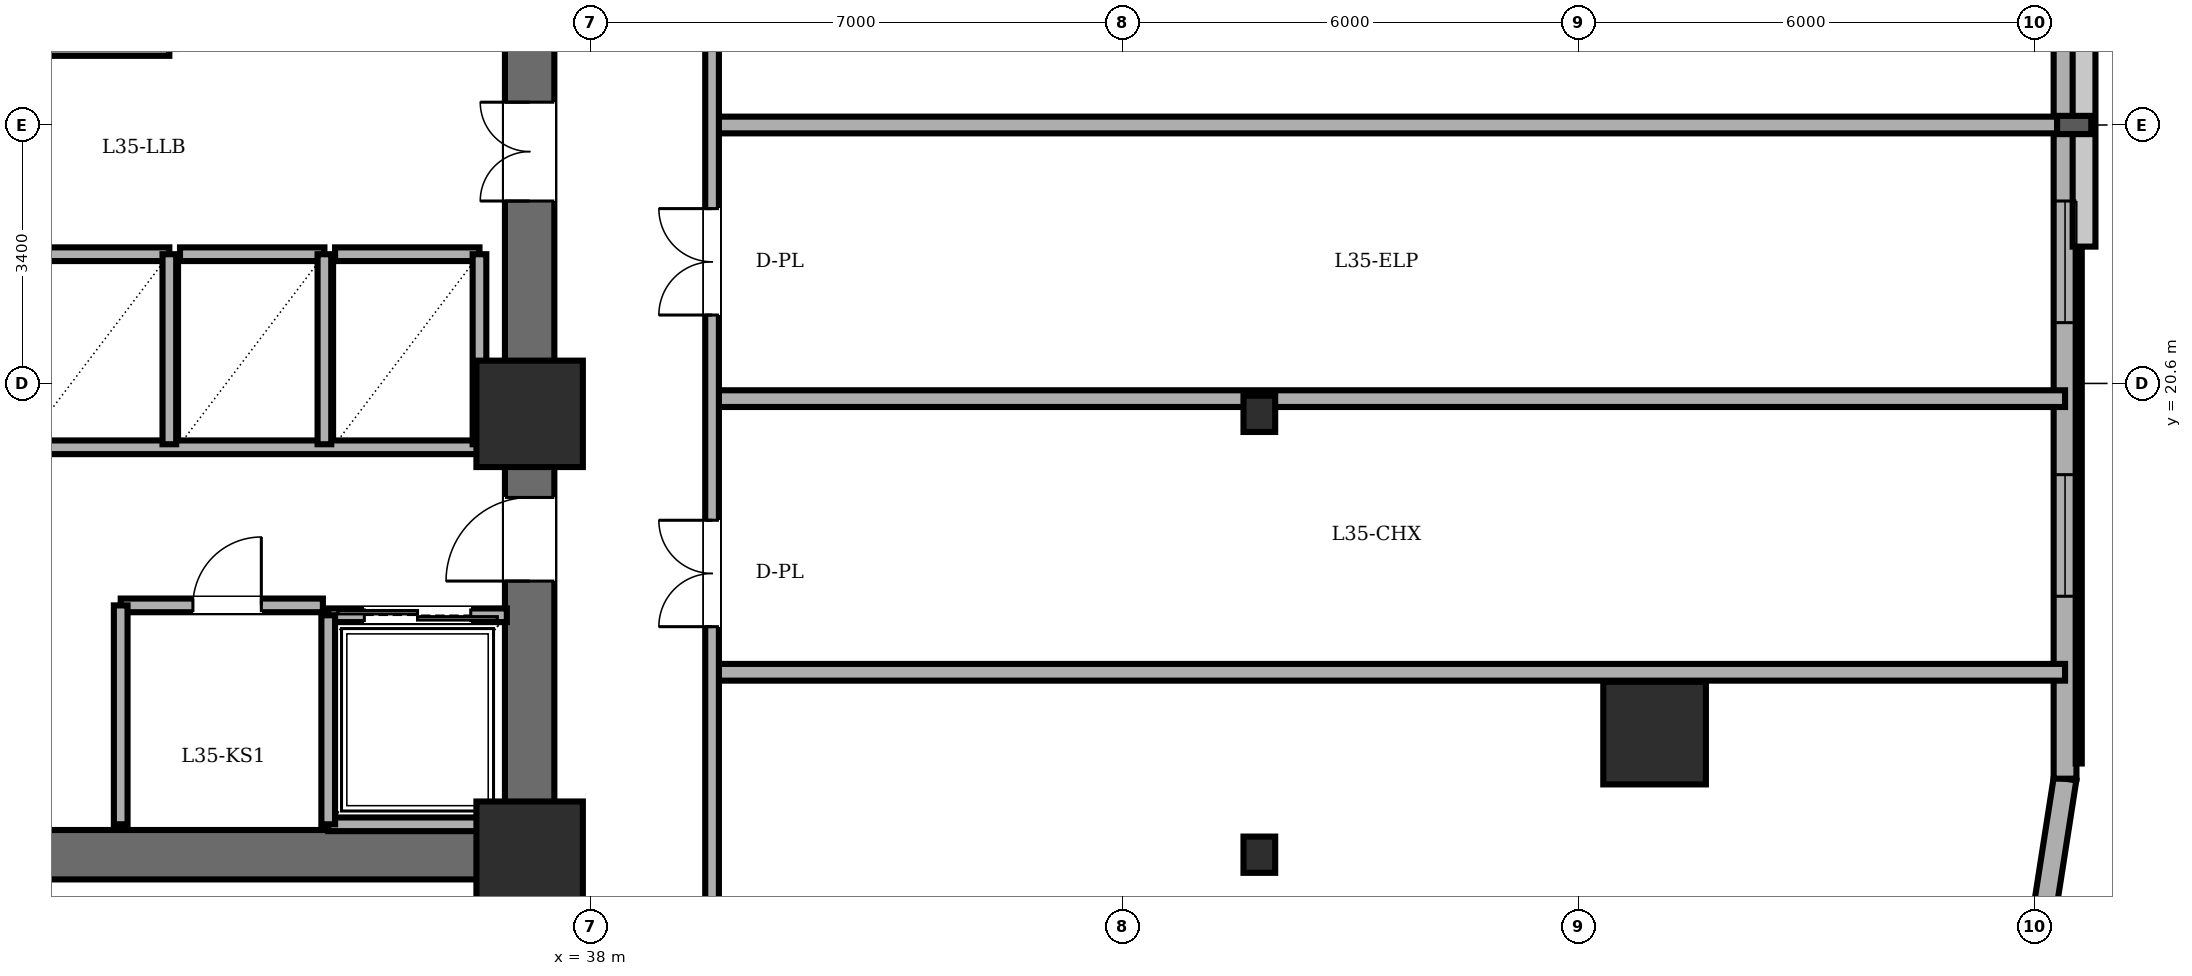
"""IFC4 building model, lengths in metres.
Left out: names, types, materials, properties, quantities, classifications, styles, units other than length and angle.
Written with IfcOpenShell. Run it as: python <this file> out.ifc"""

import sys

from ifc_helpers import new_model, si_unit, direction, frame, frame_2d, origin, origin_2d, place, context, subcontext, project, spatial, rectangle, circle, i_section, extrude, element, fill, save


model = new_model("IFC4")
c1 = context("Model", 3, precision=1e-05, world=origin(), true_north=direction((0.0, 1.0)))
c2 = subcontext(c1, "Body", "Model", "MODEL_VIEW")
j1 = project(units=[si_unit("LENGTHUNIT", "METRE"), si_unit("PLANEANGLEUNIT", "RADIAN")], contexts=[c1])
p1 = place(None, origin())
s1 = spatial("IfcSite", under=j1, at=p1, CompositionType="ELEMENT")
p2 = place(p1, origin())
s2 = spatial("IfcBuilding", under=s1, at=p2, CompositionType="ELEMENT")
p3 = place(p2, frame((0.0, 0.0, 133.1)))
s3 = spatial("IfcBuildingStorey", under=s2, at=p3, CompositionType="ELEMENT", Elevation=133.1)
for number, where, z_axis, x_axis in (
    (1, (37.2, 14.4, 0.0), (0.0, 0.0, 1.0), (1.0, 0.0, 0.0)),
    (2, (37.2, 20.2, 0.0), (0.0, 0.0, 1.0), (1.0, 0.0, 0.0)),
):
    element("IfcColumn", number, at=place(p3, frame(where, z_axis=z_axis, x_axis=x_axis)), inside=s3, PredefinedType="COLUMN", context=c2, shape_type="SweptSolid", body=[
        extrude(rectangle(XDim=1.4, YDim=1.4, at=origin_2d()), origin(), (0.0, 0.0, 1.0), 5.6),
    ])
p4 = place(p3, frame((52.0, 16.0, 0.0), z_axis=(0.0, 0.0, 1.0), x_axis=(1.0, 0.0, 0.0)))
e3 = element("IfcColumn", 3, at=p4, inside=s3, PredefinedType="COLUMN", context=c2, shape_type="SweptSolid", body=[
    extrude(circle(Radius=0.675, at=origin_2d()), origin(), (0.0, 0.0, 1.0), 2.96),
])
for number, where, z_axis, x_axis in (
    (4, (46.8, 14.4, 0.0), (0.0, 0.0, 1.0), (1.0, 0.0, 0.0)),
    (5, (46.8, 20.2, 0.0), (0.0, 0.0, 1.0), (1.0, 0.0, 0.0)),
):
    element("IfcColumn", number, at=place(p3, frame(where, z_axis=z_axis, x_axis=x_axis)), inside=s3, PredefinedType="COLUMN", context=c2, shape_type="SweptSolid", body=[
        extrude(i_section(OverallWidth=0.417, OverallDepth=0.477, WebThickness=0.036, FlangeThickness=0.057, FilletRadius=0.015, at=origin_2d()), origin(), (0.0, 0.0, 1.0), 2.96),
    ])
p5 = place(p3, frame((57.135, 13.696, 0.0), z_axis=(0.0, 0.0, 1.0), x_axis=(0.153620989032, 0.988129845581, 0.0)))
e6 = element("IfcWall", 6, at=p5, inside=s3, PredefinedType="SOLIDWALL", context=c2, shape_type="SweptSolid", body=[
    extrude(rectangle(XDim=1.724, YDim=0.3, at=frame_2d((0.862, 0.0))), origin(), (0.0, 0.0, 1.0), 5.36),
])
p6 = place(p3, frame((57.4, 15.4, 0.0), z_axis=(0.0, 0.0, 1.0), x_axis=(0.0, 1.0, 0.0)))
e7 = element("IfcWall", 7, at=p6, inside=s3, PredefinedType="SOLIDWALL", context=c2, shape_type="SweptSolid", body=[
    extrude(rectangle(XDim=17.2, YDim=0.3, at=frame_2d((8.6, 0.0))), origin(), (0.0, 0.0, 1.0), 5.36),
])
p7 = place(p6, frame((2.4, 0.0, 0.85)))
e8 = element("IfcOpeningElement", 8, at=p7, cuts=e7, PredefinedType="OPENING", context=c2, shape_type="SweptSolid", body=[
    extrude(rectangle(XDim=1.6, YDim=1.2, at=frame_2d((0.8, 0.6))), frame((0.0, 0.16, 0.0), z_axis=(0.0, -1.0, 0.0), x_axis=(1.0, 0.0, 0.0)), (0.0, 0.0, 1.0), 0.32),
])
p8 = place(p6, frame((6.0, 0.0, 0.85)))
e9 = element("IfcOpeningElement", 9, at=p8, cuts=e7, PredefinedType="OPENING", context=c2, shape_type="SweptSolid", body=[
    extrude(rectangle(XDim=1.6, YDim=1.2, at=frame_2d((0.8, 0.6))), frame((0.0, 0.16, 0.0), z_axis=(0.0, -1.0, 0.0), x_axis=(1.0, 0.0, 0.0)), (0.0, 0.0, 1.0), 0.32),
])
p9 = place(p6, frame((10.55, 0.0, 0.85)))
e10 = element("IfcOpeningElement", 10, at=p9, cuts=e7, PredefinedType="OPENING", context=c2, shape_type="SweptSolid", body=[
    extrude(rectangle(XDim=1.6, YDim=1.2, at=frame_2d((0.8, 0.6))), frame((0.0, 0.16, 0.0), z_axis=(0.0, -1.0, 0.0), x_axis=(1.0, 0.0, 0.0)), (0.0, 0.0, 1.0), 0.32),
])
p10 = place(p6, frame((13.3, 0.0, 0.85)))
e11 = element("IfcOpeningElement", 11, at=p10, cuts=e7, PredefinedType="OPENING", context=c2, shape_type="SweptSolid", body=[
    extrude(rectangle(XDim=1.6, YDim=1.2, at=frame_2d((0.8, 0.6))), frame((0.0, 0.16, 0.0), z_axis=(0.0, -1.0, 0.0), x_axis=(1.0, 0.0, 0.0)), (0.0, 0.0, 1.0), 0.32),
])
p11 = place(p3, frame((37.2, 14.4, 0.0), z_axis=(0.0, 0.0, 1.0), x_axis=(-1.0, 0.0, 0.0)))
e12 = element("IfcWall", 12, at=p11, inside=s3, PredefinedType="SHEAR", context=c2, shape_type="SweptSolid", body=[
    extrude(rectangle(XDim=15.6, YDim=0.65, at=frame_2d((7.8, 0.0))), origin(), (0.0, 0.0, 1.0), 5.36),
])
p12 = place(p3, frame((37.2, 14.4, 0.0), z_axis=(0.0, 0.0, 1.0), x_axis=(0.0, 1.0, 0.0)))
e13 = element("IfcWall", 13, at=p12, inside=s3, PredefinedType="SHEAR", context=c2, shape_type="SweptSolid", body=[
    extrude(rectangle(XDim=19.2, YDim=0.65, at=frame_2d((9.6, 0.0))), origin(), (0.0, 0.0, 1.0), 5.36),
])
p13 = place(p12, frame((15.8, 0.0, 0.0)))
e14 = element("IfcOpeningElement", 14, at=p13, cuts=e13, PredefinedType="OPENING", context=c2, shape_type="SweptSolid", body=[
    extrude(rectangle(XDim=1.15, YDim=2.15, at=frame_2d((0.575, 1.075))), frame((0.0, 0.335, 0.0), z_axis=(0.0, -1.0, 0.0), x_axis=(1.0, 0.0, 0.0)), (0.0, 0.0, 1.0), 0.67),
])
p14 = place(p12, frame((3.6, 0.0, 0.0)))
e15 = element("IfcOpeningElement", 15, at=p14, cuts=e13, PredefinedType="OPENING", context=c2, shape_type="SweptSolid", body=[
    extrude(rectangle(XDim=1.1, YDim=2.15, at=frame_2d((0.55, 1.075))), frame((0.0, 0.335, 0.0), z_axis=(0.0, -1.0, 0.0), x_axis=(1.0, 0.0, 0.0)), (0.0, 0.0, 1.0), 0.67),
])
p15 = place(p12, frame((8.6, 0.0, 0.0)))
e16 = element("IfcOpeningElement", 16, at=p15, cuts=e13, PredefinedType="OPENING", context=c2, shape_type="SweptSolid", body=[
    extrude(rectangle(XDim=1.3, YDim=2.2, at=frame_2d((0.65, 1.1))), frame((0.0, 0.335, 0.0), z_axis=(0.0, -1.0, 0.0), x_axis=(1.0, 0.0, 0.0)), (0.0, 0.0, 1.0), 0.67),
])
p16 = place(p3, frame((21.95, 19.76, 0.0), z_axis=(0.0, 0.0, 1.0), x_axis=(1.0, 0.0, 0.0)))
e17 = element("IfcWall", 17, at=p16, inside=s3, PredefinedType="PARTITIONING", context=c2, shape_type="SweptSolid", body=[
    extrude(rectangle(XDim=14.87, YDim=0.18, at=frame_2d((7.435, 0.0))), origin(), (0.0, 0.0, 1.0), 5.36),
])
p17 = place(p3, frame((31.82, 17.68, 0.0), z_axis=(0.0, 0.0, 1.0), x_axis=(1.0, 0.0, 0.0)))
e18 = element("IfcWall", 18, at=p17, inside=s3, PredefinedType="PARTITIONING", context=c2, shape_type="SweptSolid", body=[
    extrude(rectangle(XDim=2.66, YDim=0.18, at=frame_2d((1.33, 0.0))), origin(), (0.0, 0.0, 1.0), 5.36),
])
p18 = place(p17, frame((0.95, 0.0, 0.0)))
e19 = element("IfcOpeningElement", 19, at=p18, cuts=e18, PredefinedType="OPENING", context=c2, shape_type="SweptSolid", body=[
    extrude(rectangle(XDim=0.9, YDim=2.05, at=frame_2d((0.45, 1.025))), frame((0.0, 0.1, 0.0), z_axis=(0.0, -1.0, 0.0), x_axis=(1.0, 0.0, 0.0)), (0.0, 0.0, 1.0), 0.2),
])
p19 = place(p3, frame((31.82, 14.8, 0.0), z_axis=(0.0, 0.0, 1.0), x_axis=(0.0, 1.0, 0.0)))
e20 = element("IfcWall", 20, at=p19, inside=s3, PredefinedType="PARTITIONING", context=c2, shape_type="SweptSolid", body=[
    extrude(rectangle(XDim=2.88, YDim=0.18, at=frame_2d((1.44, 0.0))), origin(), (0.0, 0.0, 1.0), 5.36),
])
p20 = place(p3, frame((34.55, 17.55, 0.0), z_axis=(0.0, 0.0, 1.0), x_axis=(1.0, 0.0, 0.0)))
e21 = element("IfcWall", 21, at=p20, inside=s3, PredefinedType="PARTITIONING", context=c2, shape_type="SweptSolid", body=[
    extrude(rectangle(XDim=2.35, YDim=0.18, at=frame_2d((1.175, 0.0))), origin(), (0.0, 0.0, 1.0), 5.36),
])
p21 = place(p20, frame((0.475, 0.0, 0.0)))
e22 = element("IfcOpeningElement", 22, at=p21, cuts=e21, PredefinedType="OPENING", context=c2, shape_type="SweptSolid", body=[
    extrude(rectangle(XDim=1.4, YDim=2.3, at=frame_2d((0.7, 1.15))), frame((0.0, 0.1, 0.0), z_axis=(0.0, -1.0, 0.0), x_axis=(1.0, 0.0, 0.0)), (0.0, 0.0, 1.0), 0.2),
])
p22 = place(p3, frame((36.9, 14.8, 0.0), z_axis=(0.0, 0.0, 1.0), x_axis=(-1.0, 0.0, 0.0)))
e23 = element("IfcWall", 23, at=p22, inside=s3, PredefinedType="PARTITIONING", context=c2, shape_type="SweptSolid", body=[
    extrude(rectangle(XDim=2.35, YDim=0.18, at=frame_2d((1.175, 0.0))), origin(), (0.0, 0.0, 1.0), 2.942),
])
p23 = place(p3, frame((34.55, 17.55, 0.0), z_axis=(0.0, 0.0, 1.0), x_axis=(0.0, -1.0, 0.0)))
e24 = element("IfcWall", 24, at=p23, inside=s3, PredefinedType="PARTITIONING", context=c2, shape_type="SweptSolid", body=[
    extrude(rectangle(XDim=2.75, YDim=0.18, at=frame_2d((1.375, 0.0))), origin(), (0.0, 0.0, 1.0), 5.36),
])
p24 = place(p3, frame((32.46, 25.0, 0.0), z_axis=(0.0, 0.0, 1.0), x_axis=(-1.0, 0.0, 0.0)))
e25 = element("IfcWall", 25, at=p24, inside=s3, PredefinedType="PARTITIONING", context=c2, shape_type="SweptSolid", body=[
    extrude(rectangle(XDim=1.82, YDim=0.18, at=frame_2d((0.91, 0.0))), origin(), (0.0, 0.0, 1.0), 5.36),
])
p25 = place(p3, frame((30.56, 22.3, 0.0), z_axis=(0.0, 0.0, 1.0), x_axis=(1.0, 0.0, 0.0)))
e26 = element("IfcWall", 26, at=p25, inside=s3, PredefinedType="PARTITIONING", context=c2, shape_type="SweptSolid", body=[
    extrude(rectangle(XDim=1.9, YDim=0.18, at=frame_2d((0.95, 0.0))), origin(), (0.0, 0.0, 1.0), 5.36),
])
p26 = place(p3, frame((32.46, 19.8, 0.0), z_axis=(0.0, 0.0, 1.0), x_axis=(0.0, 1.0, 0.0)))
e27 = element("IfcWall", 27, at=p26, inside=s3, PredefinedType="PARTITIONING", context=c2, shape_type="SweptSolid", body=[
    extrude(rectangle(XDim=2.5, YDim=0.18, at=frame_2d((1.25, 0.0))), origin(), (0.0, 0.0, 1.0), 5.36),
])
p27 = place(p3, frame((32.6, 22.3, 0.0), z_axis=(0.0, 0.0, 1.0), x_axis=(1.0, 0.0, 0.0)))
e28 = element("IfcWall", 28, at=p27, inside=s3, PredefinedType="PARTITIONING", context=c2, shape_type="SweptSolid", body=[
    extrude(rectangle(XDim=1.9, YDim=0.18, at=frame_2d((0.95, 0.0))), origin(), (0.0, 0.0, 1.0), 5.36),
])
p28 = place(p3, frame((34.5, 19.8, 0.0), z_axis=(0.0, 0.0, 1.0), x_axis=(0.0, 1.0, 0.0)))
e29 = element("IfcWall", 29, at=p28, inside=s3, PredefinedType="PARTITIONING", context=c2, shape_type="SweptSolid", body=[
    extrude(rectangle(XDim=2.5, YDim=0.18, at=frame_2d((1.25, 0.0))), origin(), (0.0, 0.0, 1.0), 5.36),
])
p29 = place(p3, frame((34.64, 22.3, 0.0), z_axis=(0.0, 0.0, 1.0), x_axis=(1.0, 0.0, 0.0)))
e30 = element("IfcWall", 30, at=p29, inside=s3, PredefinedType="PARTITIONING", context=c2, shape_type="SweptSolid", body=[
    extrude(rectangle(XDim=1.9, YDim=0.18, at=frame_2d((0.95, 0.0))), origin(), (0.0, 0.0, 1.0), 5.36),
])
p30 = place(p3, frame((36.54, 19.8, 0.0), z_axis=(0.0, 0.0, 1.0), x_axis=(0.0, 1.0, 0.0)))
e31 = element("IfcWall", 31, at=p30, inside=s3, PredefinedType="PARTITIONING", context=c2, shape_type="SweptSolid", body=[
    extrude(rectangle(XDim=2.5, YDim=0.18, at=frame_2d((1.25, 0.0))), origin(), (0.0, 0.0, 1.0), 5.36),
])
p31 = place(p3, frame((39.6, 16.8, 0.0), z_axis=(0.0, 0.0, 1.0), x_axis=(1.0, 0.0, 0.0)))
e32 = element("IfcWall", 32, at=p31, inside=s3, PredefinedType="PARTITIONING", context=c2, shape_type="SweptSolid", body=[
    extrude(rectangle(XDim=17.8, YDim=0.22, at=frame_2d((8.9, 0.0))), origin(), (0.0, 0.0, 1.0), 5.36),
])
p32 = place(p3, frame((39.6, 20.4, 0.0), z_axis=(0.0, 0.0, 1.0), x_axis=(1.0, 0.0, 0.0)))
e33 = element("IfcWall", 33, at=p32, inside=s3, PredefinedType="PARTITIONING", context=c2, shape_type="SweptSolid", body=[
    extrude(rectangle(XDim=17.8, YDim=0.22, at=frame_2d((8.9, 0.0))), origin(), (0.0, 0.0, 1.0), 2.942),
])
p33 = place(p3, frame((39.6, 24.0, 0.0), z_axis=(0.0, 0.0, 1.0), x_axis=(1.0, 0.0, 0.0)))
e34 = element("IfcWall", 34, at=p33, inside=s3, PredefinedType="PARTITIONING", context=c2, shape_type="SweptSolid", body=[
    extrude(rectangle(XDim=17.8, YDim=0.22, at=frame_2d((8.9, 0.0))), origin(), (0.0, 0.0, 1.0), 5.012),
])
p34 = place(p3, frame((39.6, 11.8, 0.0), z_axis=(0.0, 0.0, 1.0), x_axis=(0.0, 1.0, 0.0)))
e35 = element("IfcWall", 35, at=p34, inside=s3, PredefinedType="PARTITIONING", context=c2, shape_type="SweptSolid", body=[
    extrude(rectangle(XDim=24.4, YDim=0.18, at=frame_2d((12.2, 0.0))), origin(), (0.0, 0.0, 1.0), 5.36),
])
p35 = place(p34, frame((18.07, 0.0, 0.0)))
e36 = element("IfcOpeningElement", 36, at=p35, cuts=e35, PredefinedType="OPENING", context=c2, shape_type="SweptSolid", body=[
    extrude(rectangle(XDim=1.4, YDim=2.25, at=frame_2d((0.7, 1.125))), frame((0.0, 0.1, 0.0), z_axis=(0.0, -1.0, 0.0), x_axis=(1.0, 0.0, 0.0)), (0.0, 0.0, 1.0), 0.2),
])
p36 = place(p34, frame((5.6, 0.0, 0.0)))
e37 = element("IfcOpeningElement", 37, at=p36, cuts=e35, PredefinedType="OPENING", context=c2, shape_type="SweptSolid", body=[
    extrude(rectangle(XDim=1.4, YDim=2.25, at=frame_2d((0.7, 1.125))), frame((0.0, 0.1, 0.0), z_axis=(0.0, -1.0, 0.0), x_axis=(1.0, 0.0, 0.0)), (0.0, 0.0, 1.0), 0.2),
])
p37 = place(p34, frame((9.7, 0.0, 0.0)))
e38 = element("IfcOpeningElement", 38, at=p37, cuts=e35, PredefinedType="OPENING", context=c2, shape_type="SweptSolid", body=[
    extrude(rectangle(XDim=1.4, YDim=2.25, at=frame_2d((0.7, 1.125))), frame((0.0, 0.1, 0.0), z_axis=(0.0, -1.0, 0.0), x_axis=(1.0, 0.0, 0.0)), (0.0, 0.0, 1.0), 0.2),
])
p38 = place(p7, origin())
e39 = element("IfcWindow", 39, at=p38, inside=s3, PartitioningType="DOUBLE_PANEL_VERTICAL", PredefinedType="WINDOW", context=c2, shape_type="SweptSolid", body=[
    extrude(rectangle(XDim=1.6, YDim=1.2, at=frame_2d((0.8, 0.6))), frame((0.0, 0.03, 0.0), z_axis=(0.0, -1.0, 0.0), x_axis=(1.0, 0.0, 0.0)), (0.0, 0.0, 1.0), 0.06),
])
fill(e8, e39)
p39 = place(p8, origin())
e40 = element("IfcWindow", 40, at=p39, inside=s3, PartitioningType="DOUBLE_PANEL_VERTICAL", PredefinedType="WINDOW", context=c2, shape_type="SweptSolid", body=[
    extrude(rectangle(XDim=1.6, YDim=1.2, at=frame_2d((0.8, 0.6))), frame((0.0, 0.03, 0.0), z_axis=(0.0, -1.0, 0.0), x_axis=(1.0, 0.0, 0.0)), (0.0, 0.0, 1.0), 0.06),
])
fill(e9, e40)
p40 = place(p14, origin())
e41 = element("IfcDoor", 41, at=p40, inside=s3, OperationType="SINGLE_SWING_LEFT", PredefinedType="DOOR", context=c2, shape_type="SweptSolid", body=[
    extrude(rectangle(XDim=1.1, YDim=2.15, at=frame_2d((0.55, 1.075))), frame((0.0, 0.025, 0.0), z_axis=(0.0, -1.0, 0.0), x_axis=(1.0, 0.0, 0.0)), (0.0, 0.0, 1.0), 0.05),
])
fill(e15, e41)
p41 = place(p18, origin())
e42 = element("IfcDoor", 42, at=p41, inside=s3, OperationType="SINGLE_SWING_RIGHT", PredefinedType="DOOR", context=c2, shape_type="SweptSolid", body=[
    extrude(rectangle(XDim=0.9, YDim=2.05, at=frame_2d((0.45, 1.025))), frame((0.0, 0.025, 0.0), z_axis=(0.0, -1.0, 0.0), x_axis=(1.0, 0.0, 0.0)), (0.0, 0.0, 1.0), 0.05),
])
fill(e19, e42)
p42 = place(p21, origin())
e43 = element("IfcDoor", 43, at=p42, inside=s3, OperationType="DOUBLE_DOOR_SLIDING", PredefinedType="DOOR", context=c2, shape_type="SweptSolid", body=[
    extrude(rectangle(XDim=1.4, YDim=2.3, at=frame_2d((0.7, 1.15))), frame((0.0, 0.025, 0.0), z_axis=(0.0, -1.0, 0.0), x_axis=(1.0, 0.0, 0.0)), (0.0, 0.0, 1.0), 0.05),
])
fill(e22, e43)
p43 = place(p15, origin())
e44 = element("IfcDoor", 44, at=p43, inside=s3, OperationType="DOUBLE_DOOR_SINGLE_SWING", PredefinedType="DOOR", context=c2, shape_type="SweptSolid", body=[
    extrude(rectangle(XDim=1.3, YDim=2.2, at=frame_2d((0.65, 1.1))), frame((0.0, 0.025, 0.0), z_axis=(0.0, -1.0, 0.0), x_axis=(1.0, 0.0, 0.0)), (0.0, 0.0, 1.0), 0.05),
])
fill(e16, e44)
p44 = place(p36, origin())
e45 = element("IfcDoor", 45, at=p44, inside=s3, OperationType="DOUBLE_DOOR_SINGLE_SWING", PredefinedType="DOOR", context=c2, shape_type="SweptSolid", body=[
    extrude(rectangle(XDim=1.4, YDim=2.25, at=frame_2d((0.7, 1.125))), frame((0.0, 0.025, 0.0), z_axis=(0.0, -1.0, 0.0), x_axis=(1.0, 0.0, 0.0)), (0.0, 0.0, 1.0), 0.05),
])
fill(e37, e45)
p45 = place(p37, origin())
e46 = element("IfcDoor", 46, at=p45, inside=s3, OperationType="DOUBLE_DOOR_SINGLE_SWING", PredefinedType="DOOR", context=c2, shape_type="SweptSolid", body=[
    extrude(rectangle(XDim=1.4, YDim=2.25, at=frame_2d((0.7, 1.125))), frame((0.0, 0.025, 0.0), z_axis=(0.0, -1.0, 0.0), x_axis=(1.0, 0.0, 0.0)), (0.0, 0.0, 1.0), 0.05),
])
fill(e38, e46)
save(model, sys.argv[1])
